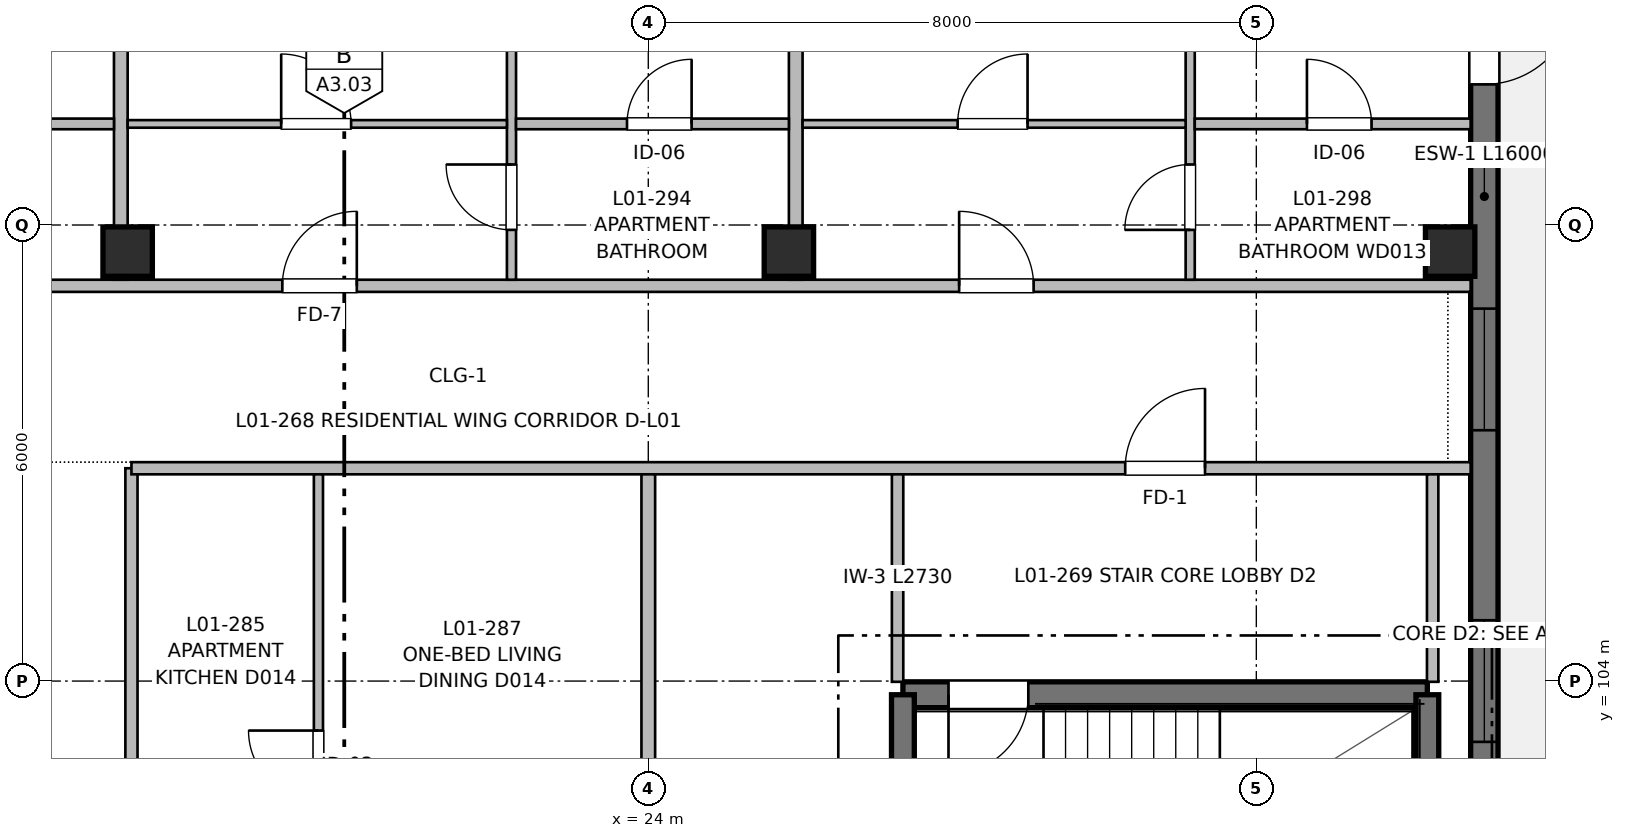
"""IFC4 building model, lengths in metres.
Left out: names, types, materials, properties, quantities, classifications, styles, units other than length and angle.
Written with IfcOpenShell. Run it as: python <this file> out.ifc"""

import sys

from ifc_helpers import new_model, si_unit, direction, frame, frame_2d, origin, origin_2d, place, context, subcontext, project, spatial, rectangle, extrude, element, fill, save


model = new_model("IFC4")
c1 = context("Model", 3, precision=1e-05, world=origin(), true_north=direction((0.0, 1.0)))
c2 = subcontext(c1, "Body", "Model", "MODEL_VIEW")
j1 = project(units=[si_unit("LENGTHUNIT", "METRE"), si_unit("PLANEANGLEUNIT", "RADIAN")], contexts=[c1])
p1 = place(None, origin())
s1 = spatial("IfcSite", under=j1, at=p1, CompositionType="ELEMENT")
p2 = place(p1, origin())
s2 = spatial("IfcBuilding", under=s1, at=p2, CompositionType="ELEMENT")
p3 = place(p2, frame((0.0, 0.0, 4.16)))
s3 = spatial("IfcBuildingStorey", under=s2, at=p3, CompositionType="ELEMENT", Elevation=4.16)
for number, where, z_axis, x_axis in (
    (1, (17.15, 109.65, 0.0), (0.0, 0.0, 1.0), (1.0, 0.0, 0.0)),
    (2, (25.85, 109.65, 0.0), (0.0, 0.0, 1.0), (1.0, 0.0, 0.0)),
    (3, (34.55, 109.65, 0.0), (0.0, 0.0, 1.0), (1.0, 0.0, 0.0)),
):
    element("IfcColumn", number, at=place(p3, frame(where, z_axis=z_axis, x_axis=x_axis)), inside=s3, PredefinedType="COLUMN", context=c2, shape_type="SweptSolid", body=[
        extrude(rectangle(XDim=0.65, YDim=0.65, at=origin_2d()), origin(), (0.0, 0.0, 1.0), 3.2),
    ])
p4 = place(p3, frame((34.25, 103.82, 0.0), z_axis=(0.0, 0.0, 1.0), x_axis=(-1.0, 0.0, 0.0)))
e4 = element("IfcWall", 4, at=p4, inside=s3, PredefinedType="SHEAR", context=c2, shape_type="SweptSolid", body=[
    extrude(rectangle(XDim=6.9, YDim=0.34, at=frame_2d((3.45, 0.0))), origin(), (0.0, 0.0, 1.0), 3.2),
])
p5 = place(p4, frame((5.25, 0.0, 0.0)))
e5 = element("IfcOpeningElement", 5, at=p5, cuts=e4, PredefinedType="OPENING", context=c2, shape_type="SweptSolid", body=[
    extrude(rectangle(XDim=1.05, YDim=2.15, at=frame_2d((0.525, 1.075))), frame((0.0, 0.18, 0.0), z_axis=(0.0, -1.0, 0.0), x_axis=(1.0, 0.0, 0.0)), (0.0, 0.0, 1.0), 0.36),
])
for number, where, z_axis, x_axis in (
    (6, (27.35, 103.82, 0.0), (0.0, 0.0, 1.0), (0.0, -1.0, 0.0)),
    (7, (34.25, 100.45, 0.0), (0.0, 0.0, 1.0), (0.0, 1.0, 0.0)),
):
    element("IfcWall", number, at=place(p3, frame(where, z_axis=z_axis, x_axis=x_axis)), inside=s3, PredefinedType="SHEAR", context=c2, shape_type="SweptSolid", body=[
        extrude(rectangle(XDim=3.37, YDim=0.3, at=frame_2d((1.685, 0.0))), origin(), (0.0, 0.0, 1.0), 3.2),
    ])
p6 = place(p3, frame((35.0, 116.0, 0.0), z_axis=(0.0, 0.0, 1.0), x_axis=(0.0, -1.0, 0.0)))
e8 = element("IfcWall", 8, at=p6, inside=s3, PredefinedType="SHEAR", context=c2, shape_type="SweptSolid", body=[
    extrude(rectangle(XDim=16.0, YDim=0.36, at=frame_2d((8.0, 0.0))), origin(), (0.0, 0.0, 1.0), 2.98),
])
p7 = place(p6, frame((2.95, 0.0, 0.0)))
e9 = element("IfcOpeningElement", 9, at=p7, cuts=e8, PredefinedType="OPENING", context=c2, shape_type="SweptSolid", body=[
    extrude(rectangle(XDim=1.2, YDim=2.2, at=frame_2d((0.6, 1.1))), frame((0.0, 0.19, 0.0), z_axis=(0.0, -1.0, 0.0), x_axis=(1.0, 0.0, 0.0)), (0.0, 0.0, 1.0), 0.38),
])
p8 = place(p6, frame((7.1, 0.0, 0.77)))
e10 = element("IfcOpeningElement", 10, at=p8, cuts=e8, PredefinedType="OPENING", context=c2, shape_type="SweptSolid", body=[
    extrude(rectangle(XDim=1.6, YDim=1.45, at=frame_2d((0.8, 0.725))), frame((0.0, 0.19, 0.0), z_axis=(0.0, -1.0, 0.0), x_axis=(1.0, 0.0, 0.0)), (0.0, 0.0, 1.0), 0.38),
])
p9 = place(p6, frame((11.2, 0.0, 0.77)))
e11 = element("IfcOpeningElement", 11, at=p9, cuts=e8, PredefinedType="OPENING", context=c2, shape_type="SweptSolid", body=[
    extrude(rectangle(XDim=1.6, YDim=1.45, at=frame_2d((0.8, 0.725))), frame((0.0, 0.19, 0.0), z_axis=(0.0, -1.0, 0.0), x_axis=(1.0, 0.0, 0.0)), (0.0, 0.0, 1.0), 0.38),
])
p10 = place(p3, frame((17.2, 56.18, 0.0), z_axis=(0.0, 0.0, 1.0), x_axis=(0.0, 1.0, 0.0)))
e12 = element("IfcWall", 12, at=p10, inside=s3, PredefinedType="PARTITIONING", context=c2, shape_type="SweptSolid", body=[
    extrude(rectangle(XDim=50.62, YDim=0.16, at=frame_2d((25.31, 0.0))), origin(), (0.0, 0.0, 1.0), 2.935),
])
p11 = place(p10, frame((6.29, 0.0, 0.0)))
e13 = element("IfcOpeningElement", 13, at=p11, cuts=e12, PredefinedType="OPENING", context=c2, shape_type="SweptSolid", body=[
    extrude(rectangle(XDim=0.98, YDim=2.15, at=frame_2d((0.49, 1.075))), frame((0.0, 0.09, 0.0), z_axis=(0.0, -1.0, 0.0), x_axis=(1.0, 0.0, 0.0)), (0.0, 0.0, 1.0), 0.18),
])
p12 = place(p10, frame((19.4, 0.0, 0.0)))
e14 = element("IfcOpeningElement", 14, at=p12, cuts=e12, PredefinedType="OPENING", context=c2, shape_type="SweptSolid", body=[
    extrude(rectangle(XDim=1.02, YDim=2.15, at=frame_2d((0.51, 1.075))), frame((0.0, 0.09, 0.0), z_axis=(0.0, -1.0, 0.0), x_axis=(1.0, 0.0, 0.0)), (0.0, 0.0, 1.0), 0.18),
])
p13 = place(p10, frame((33.08, 0.0, 0.0)))
e15 = element("IfcOpeningElement", 15, at=p13, cuts=e12, PredefinedType="OPENING", context=c2, shape_type="SweptSolid", body=[
    extrude(rectangle(XDim=0.98, YDim=2.15, at=frame_2d((0.49, 1.075))), frame((0.0, 0.09, 0.0), z_axis=(0.0, -1.0, 0.0), x_axis=(1.0, 0.0, 0.0)), (0.0, 0.0, 1.0), 0.18),
])
p14 = place(p10, frame((45.33, 0.0, 0.0)))
e16 = element("IfcOpeningElement", 16, at=p14, cuts=e12, PredefinedType="OPENING", context=c2, shape_type="SweptSolid", body=[
    extrude(rectangle(XDim=0.98, YDim=2.15, at=frame_2d((0.49, 1.075))), frame((0.0, 0.09, 0.0), z_axis=(0.0, -1.0, 0.0), x_axis=(1.0, 0.0, 0.0)), (0.0, 0.0, 1.0), 0.18),
])
p15 = place(p3, frame((17.2, 106.8, 0.0), z_axis=(0.0, 0.0, 1.0), x_axis=(1.0, 0.0, 0.0)))
e17 = element("IfcWall", 17, at=p15, inside=s3, PredefinedType="PARTITIONING", context=c2, shape_type="SweptSolid", body=[
    extrude(rectangle(XDim=17.62, YDim=0.16, at=frame_2d((8.81, 0.0))), origin(), (0.0, 0.0, 1.0), 2.935),
])
p16 = place(p15, frame((13.075, 0.0, 0.0)))
e18 = element("IfcOpeningElement", 18, at=p16, cuts=e17, PredefinedType="OPENING", context=c2, shape_type="SweptSolid", body=[
    extrude(rectangle(XDim=1.05, YDim=2.15, at=frame_2d((0.525, 1.075))), frame((0.0, 0.09, 0.0), z_axis=(0.0, -1.0, 0.0), x_axis=(1.0, 0.0, 0.0)), (0.0, 0.0, 1.0), 0.18),
])
p17 = place(p3, frame((8.18, 109.2, 0.0), z_axis=(0.0, 0.0, 1.0), x_axis=(1.0, 0.0, 0.0)))
e19 = element("IfcWall", 19, at=p17, inside=s3, PredefinedType="PARTITIONING", context=c2, shape_type="SweptSolid", body=[
    extrude(rectangle(XDim=26.64, YDim=0.16, at=frame_2d((13.32, 0.0))), origin(), (0.0, 0.0, 1.0), 2.935),
])
p18 = place(p17, frame((2.06, 0.0, 0.0)))
e20 = element("IfcOpeningElement", 20, at=p18, cuts=e19, PredefinedType="OPENING", context=c2, shape_type="SweptSolid", body=[
    extrude(rectangle(XDim=0.98, YDim=2.15, at=frame_2d((0.49, 1.075))), frame((0.0, 0.09, 0.0), z_axis=(0.0, -1.0, 0.0), x_axis=(1.0, 0.0, 0.0)), (0.0, 0.0, 1.0), 0.18),
])
p19 = place(p17, frame((11.005, 0.0, 0.0)))
e21 = element("IfcOpeningElement", 21, at=p19, cuts=e19, PredefinedType="OPENING", context=c2, shape_type="SweptSolid", body=[
    extrude(rectangle(XDim=0.98, YDim=2.15, at=frame_2d((0.49, 1.075))), frame((0.0, 0.09, 0.0), z_axis=(0.0, -1.0, 0.0), x_axis=(1.0, 0.0, 0.0)), (0.0, 0.0, 1.0), 0.18),
])
p20 = place(p17, frame((19.91, 0.0, 0.0)))
e22 = element("IfcOpeningElement", 22, at=p20, cuts=e19, PredefinedType="OPENING", context=c2, shape_type="SweptSolid", body=[
    extrude(rectangle(XDim=0.98, YDim=2.15, at=frame_2d((0.49, 1.075))), frame((0.0, 0.09, 0.0), z_axis=(0.0, -1.0, 0.0), x_axis=(1.0, 0.0, 0.0)), (0.0, 0.0, 1.0), 0.18),
])
p21 = place(p3, frame((24.0, 100.05, 0.0), z_axis=(0.0, 0.0, 1.0), x_axis=(0.0, 1.0, 0.0)))
e23 = element("IfcWall", 23, at=p21, inside=s3, PredefinedType="PARTITIONING", context=c2, shape_type="SweptSolid", body=[
    extrude(rectangle(XDim=6.67, YDim=0.18, at=frame_2d((3.335, 0.0))), origin(), (0.0, 0.0, 1.0), 2.935),
])
for number, where, z_axis, x_axis in (
    (24, (27.28, 103.99, 0.0), (0.0, 0.0, 1.0), (0.0, 1.0, 0.0)),
    (25, (34.32, 103.99, 0.0), (0.0, 0.0, 1.0), (0.0, 1.0, 0.0)),
):
    element("IfcWall", number, at=place(p3, frame(where, z_axis=z_axis, x_axis=x_axis)), inside=s3, PredefinedType="PARTITIONING", context=c2, shape_type="SweptSolid", body=[
        extrude(rectangle(XDim=2.73, YDim=0.15, at=frame_2d((1.365, 0.0))), origin(), (0.0, 0.0, 1.0), 2.935),
    ])
p22 = place(p3, frame((19.66, 95.69, 0.0), z_axis=(0.0, 0.0, 1.0), x_axis=(0.0, 1.0, 0.0)))
e26 = element("IfcWall", 26, at=p22, inside=s3, PredefinedType="PARTITIONING", context=c2, shape_type="SweptSolid", body=[
    extrude(rectangle(XDim=11.03, YDim=0.12, at=frame_2d((5.515, 0.0))), origin(), (0.0, 0.0, 1.0), 2.935),
])
p23 = place(p22, frame((1.927, 0.0, 0.0)))
e27 = element("IfcOpeningElement", 27, at=p23, cuts=e26, PredefinedType="OPENING", context=c2, shape_type="SweptSolid", body=[
    extrude(rectangle(XDim=0.86, YDim=2.1, at=frame_2d((0.43, 1.05))), frame((0.0, 0.07, 0.0), z_axis=(0.0, -1.0, 0.0), x_axis=(1.0, 0.0, 0.0)), (0.0, 0.0, 1.0), 0.14),
])
p24 = place(p22, frame((6.739, 0.0, 0.0)))
e28 = element("IfcOpeningElement", 28, at=p24, cuts=e26, PredefinedType="OPENING", context=c2, shape_type="SweptSolid", body=[
    extrude(rectangle(XDim=0.92, YDim=2.1, at=frame_2d((0.46, 1.05))), frame((0.0, 0.07, 0.0), z_axis=(0.0, -1.0, 0.0), x_axis=(1.0, 0.0, 0.0)), (0.0, 0.0, 1.0), 0.14),
])
for number, where, z_axis, x_axis in (
    (29, (17.06, 109.28, 0.0), (0.0, 0.0, 1.0), (0.0, 1.0, 0.0)),
    (30, (25.94, 109.28, 0.0), (0.0, 0.0, 1.0), (0.0, 1.0, 0.0)),
):
    element("IfcWall", number, at=place(p3, frame(where, z_axis=z_axis, x_axis=x_axis)), inside=s3, PredefinedType="PARTITIONING", context=c2, shape_type="SweptSolid", body=[
        extrude(rectangle(XDim=6.6, YDim=0.18, at=frame_2d((3.3, 0.0))), origin(), (0.0, 0.0, 1.0), 2.68),
    ])
p25 = place(p3, frame((13.34, 111.33, 0.0), z_axis=(0.0, 0.0, 1.0), x_axis=(1.0, 0.0, 0.0)))
e31 = element("IfcWall", 31, at=p25, inside=s3, PredefinedType="PARTITIONING", context=c2, shape_type="SweptSolid", body=[
    extrude(rectangle(XDim=3.63, YDim=0.14, at=frame_2d((1.815, 0.0))), origin(), (0.0, 0.0, 1.0), 2.935),
])
p26 = place(p25, frame((1.476, 0.0, 0.0)))
e32 = element("IfcOpeningElement", 32, at=p26, cuts=e31, PredefinedType="OPENING", context=c2, shape_type="SweptSolid", body=[
    extrude(rectangle(XDim=0.85, YDim=2.05, at=frame_2d((0.425, 1.025))), frame((0.0, 0.08, 0.0), z_axis=(0.0, -1.0, 0.0), x_axis=(1.0, 0.0, 0.0)), (0.0, 0.0, 1.0), 0.16),
])
p27 = place(p3, frame((22.2, 109.28, 0.0), z_axis=(0.0, 0.0, 1.0), x_axis=(0.0, 1.0, 0.0)))
e33 = element("IfcWall", 33, at=p27, inside=s3, PredefinedType="PARTITIONING", context=c2, shape_type="SweptSolid", body=[
    extrude(rectangle(XDim=6.6, YDim=0.12, at=frame_2d((3.3, 0.0))), origin(), (0.0, 0.0, 1.0), 2.935),
])
p28 = place(p27, frame((0.656, 0.0, 0.0)))
e34 = element("IfcOpeningElement", 34, at=p28, cuts=e33, PredefinedType="OPENING", context=c2, shape_type="SweptSolid", body=[
    extrude(rectangle(XDim=0.86, YDim=2.1, at=frame_2d((0.43, 1.05))), frame((0.0, 0.07, 0.0), z_axis=(0.0, -1.0, 0.0), x_axis=(1.0, 0.0, 0.0)), (0.0, 0.0, 1.0), 0.14),
])
p29 = place(p27, frame((4.097, 0.0, 0.0)))
e35 = element("IfcOpeningElement", 35, at=p29, cuts=e33, PredefinedType="OPENING", context=c2, shape_type="SweptSolid", body=[
    extrude(rectangle(XDim=0.9, YDim=2.1, at=frame_2d((0.45, 1.05))), frame((0.0, 0.07, 0.0), z_axis=(0.0, -1.0, 0.0), x_axis=(1.0, 0.0, 0.0)), (0.0, 0.0, 1.0), 0.14),
])
p30 = place(p3, frame((22.26, 111.33, 0.0), z_axis=(0.0, 0.0, 1.0), x_axis=(1.0, 0.0, 0.0)))
e36 = element("IfcWall", 36, at=p30, inside=s3, PredefinedType="PARTITIONING", context=c2, shape_type="SweptSolid", body=[
    extrude(rectangle(XDim=3.59, YDim=0.14, at=frame_2d((1.795, 0.0))), origin(), (0.0, 0.0, 1.0), 2.935),
])
p31 = place(p30, frame((1.46, 0.0, 0.0)))
e37 = element("IfcOpeningElement", 37, at=p31, cuts=e36, PredefinedType="OPENING", context=c2, shape_type="SweptSolid", body=[
    extrude(rectangle(XDim=0.85, YDim=2.05, at=frame_2d((0.425, 1.025))), frame((0.0, 0.08, 0.0), z_axis=(0.0, -1.0, 0.0), x_axis=(1.0, 0.0, 0.0)), (0.0, 0.0, 1.0), 0.16),
])
p32 = place(p3, frame((17.15, 111.33, 0.0), z_axis=(0.0, 0.0, 1.0), x_axis=(1.0, 0.0, 0.0)))
e38 = element("IfcWall", 38, at=p32, inside=s3, PredefinedType="PARTITIONING", context=c2, shape_type="SweptSolid", body=[
    extrude(rectangle(XDim=4.99, YDim=0.1, at=frame_2d((2.495, 0.0))), origin(), (0.0, 0.0, 1.0), 2.935),
])
p33 = place(p32, frame((2.02, 0.0, 0.0)))
e39 = element("IfcOpeningElement", 39, at=p33, cuts=e38, PredefinedType="OPENING", context=c2, shape_type="SweptSolid", body=[
    extrude(rectangle(XDim=0.92, YDim=2.1, at=frame_2d((0.46, 1.05))), frame((0.0, 0.06, 0.0), z_axis=(0.0, -1.0, 0.0), x_axis=(1.0, 0.0, 0.0)), (0.0, 0.0, 1.0), 0.12),
])
p34 = place(p3, frame((31.13, 109.28, 0.0), z_axis=(0.0, 0.0, 1.0), x_axis=(0.0, 1.0, 0.0)))
e40 = element("IfcWall", 40, at=p34, inside=s3, PredefinedType="PARTITIONING", context=c2, shape_type="SweptSolid", body=[
    extrude(rectangle(XDim=6.6, YDim=0.12, at=frame_2d((3.3, 0.0))), origin(), (0.0, 0.0, 1.0), 2.935),
])
p35 = place(p34, frame((0.656, 0.0, 0.0)))
e41 = element("IfcOpeningElement", 41, at=p35, cuts=e40, PredefinedType="OPENING", context=c2, shape_type="SweptSolid", body=[
    extrude(rectangle(XDim=0.86, YDim=2.1, at=frame_2d((0.43, 1.05))), frame((0.0, 0.07, 0.0), z_axis=(0.0, -1.0, 0.0), x_axis=(1.0, 0.0, 0.0)), (0.0, 0.0, 1.0), 0.14),
])
p36 = place(p34, frame((4.097, 0.0, 0.0)))
e42 = element("IfcOpeningElement", 42, at=p36, cuts=e40, PredefinedType="OPENING", context=c2, shape_type="SweptSolid", body=[
    extrude(rectangle(XDim=0.9, YDim=2.1, at=frame_2d((0.45, 1.05))), frame((0.0, 0.07, 0.0), z_axis=(0.0, -1.0, 0.0), x_axis=(1.0, 0.0, 0.0)), (0.0, 0.0, 1.0), 0.14),
])
p37 = place(p3, frame((31.19, 111.33, 0.0), z_axis=(0.0, 0.0, 1.0), x_axis=(1.0, 0.0, 0.0)))
e43 = element("IfcWall", 43, at=p37, inside=s3, PredefinedType="PARTITIONING", context=c2, shape_type="SweptSolid", body=[
    extrude(rectangle(XDim=3.63, YDim=0.14, at=frame_2d((1.815, 0.0))), origin(), (0.0, 0.0, 1.0), 2.935),
])
p38 = place(p37, frame((1.476, 0.0, 0.0)))
e44 = element("IfcOpeningElement", 44, at=p38, cuts=e43, PredefinedType="OPENING", context=c2, shape_type="SweptSolid", body=[
    extrude(rectangle(XDim=0.85, YDim=2.05, at=frame_2d((0.425, 1.025))), frame((0.0, 0.08, 0.0), z_axis=(0.0, -1.0, 0.0), x_axis=(1.0, 0.0, 0.0)), (0.0, 0.0, 1.0), 0.16),
])
p39 = place(p3, frame((26.03, 111.33, 0.0), z_axis=(0.0, 0.0, 1.0), x_axis=(1.0, 0.0, 0.0)))
e45 = element("IfcWall", 45, at=p39, inside=s3, PredefinedType="PARTITIONING", context=c2, shape_type="SweptSolid", body=[
    extrude(rectangle(XDim=5.04, YDim=0.1, at=frame_2d((2.52, 0.0))), origin(), (0.0, 0.0, 1.0), 2.935),
])
p40 = place(p39, frame((2.04, 0.0, 0.0)))
e46 = element("IfcOpeningElement", 46, at=p40, cuts=e45, PredefinedType="OPENING", context=c2, shape_type="SweptSolid", body=[
    extrude(rectangle(XDim=0.92, YDim=2.1, at=frame_2d((0.46, 1.05))), frame((0.0, 0.06, 0.0), z_axis=(0.0, -1.0, 0.0), x_axis=(1.0, 0.0, 0.0)), (0.0, 0.0, 1.0), 0.12),
])
p41 = place(p5, origin())
e47 = element("IfcDoor", 47, at=p41, inside=s3, OperationType="SINGLE_SWING_RIGHT", PredefinedType="DOOR", context=c2, shape_type="SweptSolid", body=[
    extrude(rectangle(XDim=1.05, YDim=2.15, at=frame_2d((0.525, 1.075))), frame((0.0, 0.025, 0.0), z_axis=(0.0, -1.0, 0.0), x_axis=(1.0, 0.0, 0.0)), (0.0, 0.0, 1.0), 0.05),
])
fill(e5, e47)
p42 = place(p7, origin())
e48 = element("IfcDoor", 48, at=p42, inside=s3, OperationType="SINGLE_SWING_LEFT", PredefinedType="DOOR", context=c2, shape_type="SweptSolid", body=[
    extrude(rectangle(XDim=1.2, YDim=2.2, at=frame_2d((0.6, 1.1))), frame((0.0, 0.025, 0.0), z_axis=(0.0, -1.0, 0.0), x_axis=(1.0, 0.0, 0.0)), (0.0, 0.0, 1.0), 0.05),
])
fill(e9, e48)
p43 = place(p8, origin())
e49 = element("IfcWindow", 49, at=p43, inside=s3, PartitioningType="SINGLE_PANEL", PredefinedType="WINDOW", context=c2, shape_type="SweptSolid", body=[
    extrude(rectangle(XDim=1.6, YDim=1.45, at=frame_2d((0.8, 0.725))), frame((0.0, 0.03, 0.0), z_axis=(0.0, -1.0, 0.0), x_axis=(1.0, 0.0, 0.0)), (0.0, 0.0, 1.0), 0.06),
])
fill(e10, e49)
p44 = place(p9, origin())
e50 = element("IfcWindow", 50, at=p44, inside=s3, PartitioningType="SINGLE_PANEL", PredefinedType="WINDOW", context=c2, shape_type="SweptSolid", body=[
    extrude(rectangle(XDim=1.6, YDim=1.45, at=frame_2d((0.8, 0.725))), frame((0.0, 0.03, 0.0), z_axis=(0.0, -1.0, 0.0), x_axis=(1.0, 0.0, 0.0)), (0.0, 0.0, 1.0), 0.06),
])
fill(e11, e50)
p45 = place(p16, origin())
e51 = element("IfcDoor", 51, at=p45, inside=s3, OperationType="SINGLE_SWING_RIGHT", PredefinedType="DOOR", context=c2, shape_type="SweptSolid", body=[
    extrude(rectangle(XDim=1.05, YDim=2.15, at=frame_2d((0.525, 1.075))), frame((0.0, 0.025, 0.0), z_axis=(0.0, -1.0, 0.0), x_axis=(1.0, 0.0, 0.0)), (0.0, 0.0, 1.0), 0.05),
])
fill(e18, e51)
p46 = place(p24, origin())
e52 = element("IfcDoor", 52, at=p46, inside=s3, OperationType="SINGLE_SWING_RIGHT", PredefinedType="DOOR", context=c2, shape_type="SweptSolid", body=[
    extrude(rectangle(XDim=0.92, YDim=2.1, at=frame_2d((0.46, 1.05))), frame((0.0, 0.025, 0.0), z_axis=(0.0, -1.0, 0.0), x_axis=(1.0, 0.0, 0.0)), (0.0, 0.0, 1.0), 0.05),
])
fill(e28, e52)
p47 = place(p19, origin())
e53 = element("IfcDoor", 53, at=p47, inside=s3, OperationType="SINGLE_SWING_RIGHT", PredefinedType="DOOR", context=c2, shape_type="SweptSolid", body=[
    extrude(rectangle(XDim=0.98, YDim=2.15, at=frame_2d((0.49, 1.075))), frame((0.0, 0.025, 0.0), z_axis=(0.0, -1.0, 0.0), x_axis=(1.0, 0.0, 0.0)), (0.0, 0.0, 1.0), 0.05),
])
fill(e21, e53)
p48 = place(p33, origin())
e54 = element("IfcDoor", 54, at=p48, inside=s3, OperationType="SINGLE_SWING_LEFT", PredefinedType="DOOR", context=c2, shape_type="SweptSolid", body=[
    extrude(rectangle(XDim=0.92, YDim=2.1, at=frame_2d((0.46, 1.05))), frame((0.0, 0.025, 0.0), z_axis=(0.0, -1.0, 0.0), x_axis=(1.0, 0.0, 0.0)), (0.0, 0.0, 1.0), 0.05),
])
fill(e39, e54)
p49 = place(p28, origin())
e55 = element("IfcDoor", 55, at=p49, inside=s3, OperationType="SINGLE_SWING_RIGHT", PredefinedType="DOOR", context=c2, shape_type="SweptSolid", body=[
    extrude(rectangle(XDim=0.86, YDim=2.1, at=frame_2d((0.43, 1.05))), frame((0.0, 0.025, 0.0), z_axis=(0.0, -1.0, 0.0), x_axis=(1.0, 0.0, 0.0)), (0.0, 0.0, 1.0), 0.05),
])
fill(e34, e55)
p50 = place(p31, origin())
e56 = element("IfcDoor", 56, at=p50, inside=s3, OperationType="SINGLE_SWING_RIGHT", PredefinedType="DOOR", context=c2, shape_type="SweptSolid", body=[
    extrude(rectangle(XDim=0.85, YDim=2.05, at=frame_2d((0.425, 1.025))), frame((0.0, 0.025, 0.0), z_axis=(0.0, -1.0, 0.0), x_axis=(1.0, 0.0, 0.0)), (0.0, 0.0, 1.0), 0.05),
])
fill(e37, e56)
p51 = place(p20, origin())
e57 = element("IfcDoor", 57, at=p51, inside=s3, OperationType="SINGLE_SWING_LEFT", PredefinedType="DOOR", context=c2, shape_type="SweptSolid", body=[
    extrude(rectangle(XDim=0.98, YDim=2.15, at=frame_2d((0.49, 1.075))), frame((0.0, 0.025, 0.0), z_axis=(0.0, -1.0, 0.0), x_axis=(1.0, 0.0, 0.0)), (0.0, 0.0, 1.0), 0.05),
])
fill(e22, e57)
p52 = place(p40, origin())
e58 = element("IfcDoor", 58, at=p52, inside=s3, OperationType="SINGLE_SWING_RIGHT", PredefinedType="DOOR", context=c2, shape_type="SweptSolid", body=[
    extrude(rectangle(XDim=0.92, YDim=2.1, at=frame_2d((0.46, 1.05))), frame((0.0, 0.025, 0.0), z_axis=(0.0, -1.0, 0.0), x_axis=(1.0, 0.0, 0.0)), (0.0, 0.0, 1.0), 0.05),
])
fill(e46, e58)
p53 = place(p35, origin())
e59 = element("IfcDoor", 59, at=p53, inside=s3, OperationType="SINGLE_SWING_LEFT", PredefinedType="DOOR", context=c2, shape_type="SweptSolid", body=[
    extrude(rectangle(XDim=0.86, YDim=2.1, at=frame_2d((0.43, 1.05))), frame((0.0, 0.025, 0.0), z_axis=(0.0, -1.0, 0.0), x_axis=(1.0, 0.0, 0.0)), (0.0, 0.0, 1.0), 0.05),
])
fill(e41, e59)
p54 = place(p38, origin())
e60 = element("IfcDoor", 60, at=p54, inside=s3, OperationType="SINGLE_SWING_LEFT", PredefinedType="DOOR", context=c2, shape_type="SweptSolid", body=[
    extrude(rectangle(XDim=0.85, YDim=2.05, at=frame_2d((0.425, 1.025))), frame((0.0, 0.025, 0.0), z_axis=(0.0, -1.0, 0.0), x_axis=(1.0, 0.0, 0.0)), (0.0, 0.0, 1.0), 0.05),
])
fill(e44, e60)
save(model, sys.argv[1])
